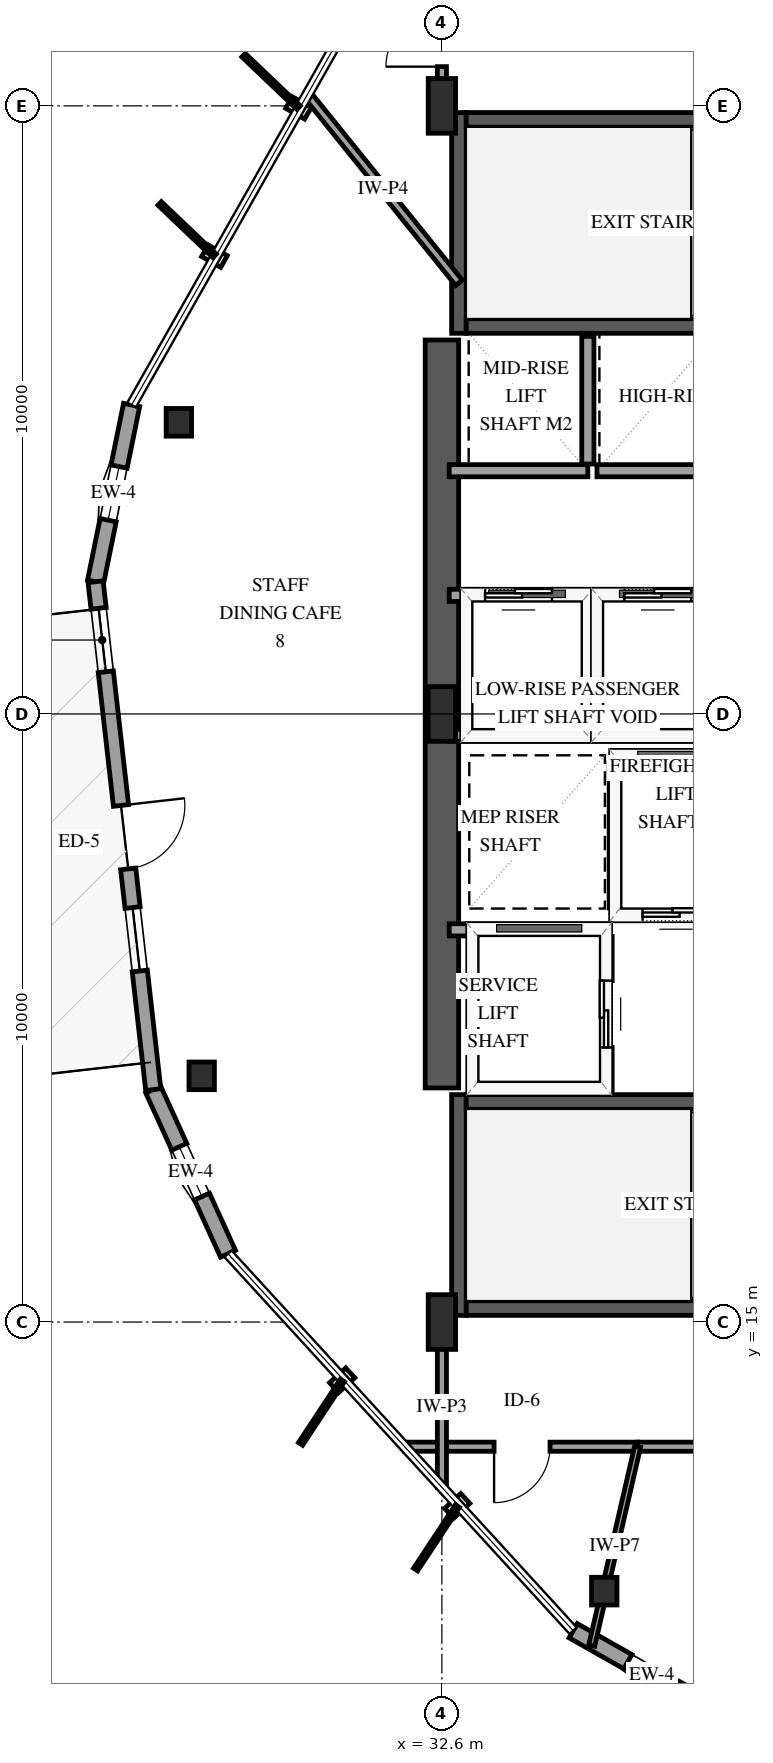
"""IFC4 building model, lengths in metres.
Left out: names, types, materials, properties, quantities, classifications, styles, units other than length and angle.
Written with IfcOpenShell. Run it as: python <this file> out.ifc"""

import sys

from ifc_helpers import new_model, si_unit, direction, frame, frame_2d, origin, origin_2d, place, context, subcontext, project, spatial, rectangle, i_section, extrude, element, fill, save


model = new_model("IFC4")
c1 = context("Model", 3, precision=1e-05, world=origin(), true_north=direction((0.0, 1.0)))
c2 = subcontext(c1, "Body", "Model", "MODEL_VIEW")
j1 = project(units=[si_unit("LENGTHUNIT", "METRE"), si_unit("PLANEANGLEUNIT", "RADIAN")], contexts=[c1])
p1 = place(None, origin())
s1 = spatial("IfcSite", under=j1, at=p1, CompositionType="ELEMENT")
p2 = place(p1, origin())
s2 = spatial("IfcBuilding", under=s1, at=p2, CompositionType="ELEMENT")
p3 = place(p2, frame((0.0, 0.0, 122.5)))
s3 = spatial("IfcBuildingStorey", under=s2, at=p3, CompositionType="ELEMENT", Elevation=122.5)
p4 = place(p3, frame((32.88, 15.11, 0.0), z_axis=(0.0, 0.0, 1.0), x_axis=(0.0, 1.0, 0.0)))
e1 = element("IfcWall", 1, at=p4, inside=s3, PredefinedType="SHEAR", context=c2, shape_type="SweptSolid", body=[
    extrude(rectangle(XDim=3.63, YDim=0.24, at=frame_2d((1.815, 0.0))), origin(), (0.0, 0.0, 1.0), 3.9),
])
for number, where, z_axis, x_axis in (
    (2, (33.0, 15.23, 0.0), (0.0, 0.0, 1.0), (1.0, 0.0, 0.0)),
    (3, (33.0, 18.62, 0.0), (0.0, 0.0, 1.0), (1.0, 0.0, 0.0)),
):
    element("IfcWall", number, at=place(p3, frame(where, z_axis=z_axis, x_axis=x_axis)), inside=s3, PredefinedType="SHEAR", context=c2, shape_type="SweptSolid", body=[
        extrude(rectangle(XDim=8.0, YDim=0.24, at=frame_2d((4.0, 0.0))), origin(), (0.0, 0.0, 1.0), 3.9),
    ])
p5 = place(p3, frame((32.88, 31.26, 0.0), z_axis=(0.0, 0.0, 1.0), x_axis=(0.0, 1.0, 0.0)))
e4 = element("IfcWall", 4, at=p5, inside=s3, PredefinedType="SHEAR", context=c2, shape_type="SweptSolid", body=[
    extrude(rectangle(XDim=3.63, YDim=0.24, at=frame_2d((1.815, 0.0))), origin(), (0.0, 0.0, 1.0), 3.9),
])
for number, where, z_axis, x_axis in (
    (5, (33.0, 31.38, 0.0), (0.0, 0.0, 1.0), (1.0, 0.0, 0.0)),
    (6, (33.0, 34.77, 0.0), (0.0, 0.0, 1.0), (1.0, 0.0, 0.0)),
):
    element("IfcWall", number, at=place(p3, frame(where, z_axis=z_axis, x_axis=x_axis)), inside=s3, PredefinedType="SHEAR", context=c2, shape_type="SweptSolid", body=[
        extrude(rectangle(XDim=8.0, YDim=0.24, at=frame_2d((4.0, 0.0))), origin(), (0.0, 0.0, 1.0), 3.9),
    ])
p6 = place(p3, frame((32.6, 18.85, 0.0), z_axis=(0.0, 0.0, 1.0), x_axis=(0.0, 1.0, 0.0)))
e7 = element("IfcWall", 7, at=p6, inside=s3, PredefinedType="SHEAR", context=c2, shape_type="SweptSolid", body=[
    extrude(rectangle(XDim=12.3, YDim=0.55, at=frame_2d((6.15, 0.0))), origin(), (0.0, 0.0, 1.0), 3.9),
])
for number, where, z_axis, x_axis in (
    (8, (32.6, 15.0, 0.0), (0.0, 0.0, 1.0), (1.0, 0.0, 0.0)),
    (9, (32.6, 25.0, 0.0), (0.0, 0.0, 1.0), (1.0, 0.0, 0.0)),
    (10, (32.6, 35.0, 0.0), (0.0, 0.0, 1.0), (1.0, 0.0, 0.0)),
):
    element("IfcColumn", number, at=place(p3, frame(where, z_axis=z_axis, x_axis=x_axis)), inside=s3, PredefinedType="PILASTER", context=c2, shape_type="SweptSolid", body=[
        extrude(rectangle(XDim=0.45, YDim=0.9, at=origin_2d()), origin(), (0.0, 0.0, 1.0), 3.9),
    ])
for number, where, z_axis, x_axis in (
    (11, (28.274, 29.796, 0.0), (0.0, 0.0, 1.0), (1.0, 0.0, 0.0)),
    (12, (28.649, 19.049, 0.0), (0.0, 0.0, 1.0), (1.0, 0.0, 0.0)),
    (13, (35.27, 10.575, 0.0), (0.0, 0.0, 1.0), (1.0, 0.0, 0.0)),
):
    element("IfcColumn", number, at=place(p3, frame(where, z_axis=z_axis, x_axis=x_axis)), inside=s3, PredefinedType="COLUMN", context=c2, shape_type="SweptSolid", body=[
        extrude(i_section(OverallWidth=0.418, OverallDepth=0.455, WebThickness=0.042, FlangeThickness=0.068, FilletRadius=0.038, at=origin_2d()), origin(), (0.0, 0.0, 1.0), 3.9),
    ])
p7 = place(p3, frame((27.497, 30.081, 0.0), z_axis=(0.0, 0.0, 1.0), x_axis=(-0.199723000862, -0.979852398541, 0.0)))
e14 = element("IfcWall", 14, at=p7, inside=s3, PredefinedType="SOLIDWALL", context=c2, shape_type="SweptSolid", body=[
    extrude(rectangle(XDim=2.967, YDim=0.27, at=frame_2d((1.483, 0.0))), origin(), (0.0, 0.0, 1.0), 2.979),
])
p8 = place(p7, frame((1.033, 0.0, 0.75)))
e15 = element("IfcOpeningElement", 15, at=p8, cuts=e14, PredefinedType="OPENING", context=c2, shape_type="SweptSolid", body=[
    extrude(rectangle(XDim=0.9, YDim=1.5, at=frame_2d((0.45, 0.75))), frame((0.0, 0.145, 0.0), z_axis=(0.0, -1.0, 0.0), x_axis=(1.0, 0.0, 0.0)), (0.0, 0.0, 1.0), 0.29),
])
p9 = place(p3, frame((27.853, 18.823, 0.0), z_axis=(0.0, 0.0, 1.0), x_axis=(0.41436090181, -0.910112654044, 0.0)))
e16 = element("IfcWall", 16, at=p9, inside=s3, PredefinedType="SOLIDWALL", context=c2, shape_type="SweptSolid", body=[
    extrude(rectangle(XDim=2.967, YDim=0.27, at=frame_2d((1.483, 0.0))), origin(), (0.0, 0.0, 1.0), 2.979),
])
p10 = place(p9, frame((1.033, 0.0, 0.75)))
e17 = element("IfcOpeningElement", 17, at=p10, cuts=e16, PredefinedType="OPENING", context=c2, shape_type="SweptSolid", body=[
    extrude(rectangle(XDim=0.9, YDim=1.5, at=frame_2d((0.45, 0.75))), frame((0.0, 0.145, 0.0), z_axis=(0.0, -1.0, 0.0), x_axis=(1.0, 0.0, 0.0)), (0.0, 0.0, 1.0), 0.29),
])
p11 = place(p3, frame((26.905, 27.174, 0.0), z_axis=(0.0, 0.0, 1.0), x_axis=(0.112873191476, -0.993609401448, 0.0)))
e18 = element("IfcWall", 18, at=p11, inside=s3, PredefinedType="SOLIDWALL", context=c2, shape_type="SweptSolid", body=[
    extrude(rectangle(XDim=8.405, YDim=0.25, at=frame_2d((4.203, 0.0))), origin(), (0.0, 0.0, 1.0), 2.979),
])
p12 = place(p11, frame((3.703, 0.0, 0.0)))
e19 = element("IfcOpeningElement", 19, at=p12, cuts=e18, PredefinedType="OPENING", context=c2, shape_type="SweptSolid", body=[
    extrude(rectangle(XDim=1.05, YDim=2.15, at=frame_2d((0.525, 1.075))), frame((0.0, 0.135, 0.0), z_axis=(0.0, -1.0, 0.0), x_axis=(1.0, 0.0, 0.0)), (0.0, 0.0, 1.0), 0.27),
])
p13 = place(p11, frame((0.44, 0.0, 0.72)))
e20 = element("IfcOpeningElement", 20, at=p13, cuts=e18, PredefinedType="OPENING", context=c2, shape_type="SweptSolid", body=[
    extrude(rectangle(XDim=1.05, YDim=1.55, at=frame_2d((0.525, 0.775))), frame((0.0, 0.135, 0.0), z_axis=(0.0, -1.0, 0.0), x_axis=(1.0, 0.0, 0.0)), (0.0, 0.0, 1.0), 0.27),
])
p14 = place(p11, frame((5.393, 0.0, 0.72)))
e21 = element("IfcOpeningElement", 21, at=p14, cuts=e18, PredefinedType="OPENING", context=c2, shape_type="SweptSolid", body=[
    extrude(rectangle(XDim=1.05, YDim=1.55, at=frame_2d((0.525, 0.775))), frame((0.0, 0.135, 0.0), z_axis=(0.0, -1.0, 0.0), x_axis=(1.0, 0.0, 0.0)), (0.0, 0.0, 1.0), 0.27),
])
p15 = place(p3, frame((34.759, 9.924, 0.0), z_axis=(0.0, 0.0, 1.0), x_axis=(0.870196274844, -0.492705229572, 0.0)))
e22 = element("IfcWall", 22, at=p15, inside=s3, PredefinedType="SOLIDWALL", context=c2, shape_type="SweptSolid", body=[
    extrude(rectangle(XDim=2.967, YDim=0.27, at=frame_2d((1.483, 0.0))), origin(), (0.0, 0.0, 1.0), 2.979),
])
p16 = place(p15, frame((1.033, 0.0, 0.75)))
e23 = element("IfcOpeningElement", 23, at=p16, cuts=e22, PredefinedType="OPENING", context=c2, shape_type="SweptSolid", body=[
    extrude(rectangle(XDim=0.9, YDim=1.5, at=frame_2d((0.45, 0.75))), frame((0.0, 0.145, 0.0), z_axis=(0.0, -1.0, 0.0), x_axis=(1.0, 0.0, 0.0)), (0.0, 0.0, 1.0), 0.29),
])
p17 = place(p3, frame((35.45, 21.7, 0.0), z_axis=(0.0, 0.0, 1.0), x_axis=(1.0, 0.0, 0.0)))
e24 = element("IfcWall", 24, at=p17, inside=s3, PredefinedType="SOLIDWALL", context=c2, shape_type="SweptSolid", body=[
    extrude(rectangle(XDim=2.0, YDim=0.2, at=frame_2d((1.0, 0.0))), origin(), (0.0, 0.0, 1.0), 3.6),
])
p18 = place(p17, frame((0.45, 0.0, 0.0)))
e25 = element("IfcOpeningElement", 25, at=p18, cuts=e24, PredefinedType="OPENING", context=c2, shape_type="SweptSolid", body=[
    extrude(rectangle(XDim=1.1, YDim=2.15, at=frame_2d((0.55, 1.075))), frame((0.0, 0.11, 0.0), z_axis=(0.0, -1.0, 0.0), x_axis=(1.0, 0.0, 0.0)), (0.0, 0.0, 1.0), 0.22),
])
p19 = place(p3, frame((35.45, 24.3, 0.0), z_axis=(0.0, 0.0, 1.0), x_axis=(1.0, 0.0, 0.0)))
e26 = element("IfcWall", 26, at=p19, inside=s3, PredefinedType="SOLIDWALL", context=c2, shape_type="SweptSolid", body=[
    extrude(rectangle(XDim=2.0, YDim=0.2, at=frame_2d((1.0, 0.0))), origin(), (0.0, 0.0, 1.0), 3.6),
])
p20 = place(p3, frame((35.45, 21.81, 0.0), z_axis=(0.0, 0.0, 1.0), x_axis=(0.0, 1.0, 0.0)))
e27 = element("IfcWall", 27, at=p20, inside=s3, PredefinedType="SOLIDWALL", context=c2, shape_type="SweptSolid", body=[
    extrude(rectangle(XDim=2.38, YDim=0.2, at=frame_2d((1.19, 0.0))), origin(), (0.0, 0.0, 1.0), 3.6),
])
p21 = place(p3, frame((32.72, 21.45, 0.0), z_axis=(0.0, 0.0, 1.0), x_axis=(1.0, 0.0, 0.0)))
e28 = element("IfcWall", 28, at=p21, inside=s3, PredefinedType="SOLIDWALL", context=c2, shape_type="SweptSolid", body=[
    extrude(rectangle(XDim=2.58, YDim=0.2, at=frame_2d((1.29, 0.0))), origin(), (0.0, 0.0, 1.0), 3.6),
])
p22 = place(p3, frame((35.3, 18.79, 0.0), z_axis=(0.0, 0.0, 1.0), x_axis=(0.0, 1.0, 0.0)))
e29 = element("IfcWall", 29, at=p22, inside=s3, PredefinedType="SOLIDWALL", context=c2, shape_type="SweptSolid", body=[
    extrude(rectangle(XDim=2.55, YDim=0.2, at=frame_2d((1.275, 0.0))), origin(), (0.0, 0.0, 1.0), 3.6),
])
p23 = place(p22, frame((0.725, 0.0, 0.0)))
e30 = element("IfcOpeningElement", 30, at=p23, cuts=e29, PredefinedType="OPENING", context=c2, shape_type="SweptSolid", body=[
    extrude(rectangle(XDim=1.1, YDim=2.15, at=frame_2d((0.55, 1.075))), frame((0.0, 0.11, 0.0), z_axis=(0.0, -1.0, 0.0), x_axis=(1.0, 0.0, 0.0)), (0.0, 0.0, 1.0), 0.22),
])
p24 = place(p3, frame((32.72, 24.65, 0.0), z_axis=(0.0, 0.0, 1.0), x_axis=(1.0, 0.0, 0.0)))
e31 = element("IfcWall", 31, at=p24, inside=s3, PredefinedType="SOLIDWALL", context=c2, shape_type="SweptSolid", body=[
    extrude(rectangle(XDim=2.28, YDim=0.2, at=frame_2d((1.14, 0.0))), origin(), (0.0, 0.0, 1.0), 3.6),
])
p25 = place(p3, frame((32.72, 26.95, 0.0), z_axis=(0.0, 0.0, 1.0), x_axis=(1.0, 0.0, 0.0)))
e32 = element("IfcWall", 32, at=p25, inside=s3, PredefinedType="SOLIDWALL", context=c2, shape_type="SweptSolid", body=[
    extrude(rectangle(XDim=2.28, YDim=0.2, at=frame_2d((1.14, 0.0))), origin(), (0.0, 0.0, 1.0), 3.6),
])
p26 = place(p25, frame((0.59, 0.0, 0.0)))
e33 = element("IfcOpeningElement", 33, at=p26, cuts=e32, PredefinedType="OPENING", context=c2, shape_type="SweptSolid", body=[
    extrude(rectangle(XDim=1.1, YDim=2.15, at=frame_2d((0.55, 1.075))), frame((0.0, 0.11, 0.0), z_axis=(0.0, -1.0, 0.0), x_axis=(1.0, 0.0, 0.0)), (0.0, 0.0, 1.0), 0.22),
])
p27 = place(p3, frame((35.0, 24.76, 0.0), z_axis=(0.0, 0.0, 1.0), x_axis=(0.0, 1.0, 0.0)))
e34 = element("IfcWall", 34, at=p27, inside=s3, PredefinedType="SOLIDWALL", context=c2, shape_type="SweptSolid", body=[
    extrude(rectangle(XDim=2.08, YDim=0.2, at=frame_2d((1.04, 0.0))), origin(), (0.0, 0.0, 1.0), 3.6),
])
p28 = place(p3, frame((35.15, 24.65, 0.0), z_axis=(0.0, 0.0, 1.0), x_axis=(1.0, 0.0, 0.0)))
e35 = element("IfcWall", 35, at=p28, inside=s3, PredefinedType="SOLIDWALL", context=c2, shape_type="SweptSolid", body=[
    extrude(rectangle(XDim=2.0, YDim=0.2, at=frame_2d((1.0, 0.0))), origin(), (0.0, 0.0, 1.0), 3.6),
])
p29 = place(p3, frame((35.15, 26.95, 0.0), z_axis=(0.0, 0.0, 1.0), x_axis=(1.0, 0.0, 0.0)))
e36 = element("IfcWall", 36, at=p29, inside=s3, PredefinedType="SOLIDWALL", context=c2, shape_type="SweptSolid", body=[
    extrude(rectangle(XDim=2.0, YDim=0.2, at=frame_2d((1.0, 0.0))), origin(), (0.0, 0.0, 1.0), 3.6),
])
p30 = place(p29, frame((0.45, 0.0, 0.0)))
e37 = element("IfcOpeningElement", 37, at=p30, cuts=e36, PredefinedType="OPENING", context=c2, shape_type="SweptSolid", body=[
    extrude(rectangle(XDim=1.1, YDim=2.15, at=frame_2d((0.55, 1.075))), frame((0.0, 0.11, 0.0), z_axis=(0.0, -1.0, 0.0), x_axis=(1.0, 0.0, 0.0)), (0.0, 0.0, 1.0), 0.22),
])
p31 = place(p3, frame((32.72, 29.0, 0.0), z_axis=(0.0, 0.0, 1.0), x_axis=(1.0, 0.0, 0.0)))
e38 = element("IfcWall", 38, at=p31, inside=s3, PredefinedType="SOLIDWALL", context=c2, shape_type="SweptSolid", body=[
    extrude(rectangle(XDim=2.28, YDim=0.2, at=frame_2d((1.14, 0.0))), origin(), (0.0, 0.0, 1.0), 3.6),
])
p32 = place(p3, frame((35.0, 29.11, 0.0), z_axis=(0.0, 0.0, 1.0), x_axis=(0.0, 1.0, 0.0)))
e39 = element("IfcWall", 39, at=p32, inside=s3, PredefinedType="SOLIDWALL", context=c2, shape_type="SweptSolid", body=[
    extrude(rectangle(XDim=2.1, YDim=0.2, at=frame_2d((1.05, 0.0))), origin(), (0.0, 0.0, 1.0), 3.6),
])
p33 = place(p3, frame((35.15, 29.0, 0.0), z_axis=(0.0, 0.0, 1.0), x_axis=(1.0, 0.0, 0.0)))
e40 = element("IfcWall", 40, at=p33, inside=s3, PredefinedType="SOLIDWALL", context=c2, shape_type="SweptSolid", body=[
    extrude(rectangle(XDim=2.0, YDim=0.2, at=frame_2d((1.0, 0.0))), origin(), (0.0, 0.0, 1.0), 3.6),
])
p34 = place(p3, frame((43.455, 12.95, 0.0), z_axis=(0.0, 0.0, 1.0), x_axis=(-1.0, 0.0, 0.0)))
e41 = element("IfcWall", 41, at=p34, inside=s3, PredefinedType="PARTITIONING", context=c2, shape_type="SweptSolid", body=[
    extrude(rectangle(XDim=7.637, YDim=0.15, at=frame_2d((3.818, 0.0))), origin(), (0.0, 0.0, 1.0), 3.6),
])
p35 = place(p34, frame((3.344, 0.0, 0.0)))
e42 = element("IfcOpeningElement", 42, at=p35, cuts=e41, PredefinedType="OPENING", context=c2, shape_type="SweptSolid", body=[
    extrude(rectangle(XDim=0.92, YDim=2.12, at=frame_2d((0.46, 1.06))), frame((0.0, 0.085, 0.0), z_axis=(0.0, -1.0, 0.0), x_axis=(1.0, 0.0, 0.0)), (0.0, 0.0, 1.0), 0.17),
])
p36 = place(p3, frame((32.88, 32.091, 0.0), z_axis=(0.0, 0.0, 1.0), x_axis=(-0.627800500923, 0.778374287243, 0.0)))
e43 = element("IfcWall", 43, at=p36, inside=s3, PredefinedType="PARTITIONING", context=c2, shape_type="SweptSolid", body=[
    extrude(rectangle(XDim=3.972, YDim=0.14, at=frame_2d((1.986, 0.0))), origin(), (0.0, 0.0, 1.0), 3.6),
])
p37 = place(p3, frame((35.818, 12.95, 0.0), z_axis=(0.0, 0.0, 1.0), x_axis=(-1.0, 0.0, 0.0)))
e44 = element("IfcWall", 44, at=p37, inside=s3, PredefinedType="PARTITIONING", context=c2, shape_type="SweptSolid", body=[
    extrude(rectangle(XDim=3.83, YDim=0.15, at=frame_2d((1.915, 0.0))), origin(), (0.0, 0.0, 1.0), 3.6),
])
p38 = place(p37, frame((1.44, 0.0, 0.0)))
e45 = element("IfcOpeningElement", 45, at=p38, cuts=e44, PredefinedType="OPENING", context=c2, shape_type="SweptSolid", body=[
    extrude(rectangle(XDim=0.92, YDim=2.12, at=frame_2d((0.46, 1.06))), frame((0.0, 0.085, 0.0), z_axis=(0.0, -1.0, 0.0), x_axis=(1.0, 0.0, 0.0)), (0.0, 0.0, 1.0), 0.17),
])
p39 = place(p3, frame((35.818, 12.95, 0.0), z_axis=(0.0, 0.0, 1.0), x_axis=(-0.224790414322, -0.974407137509, 0.0)))
e46 = element("IfcWall", 46, at=p39, inside=s3, PredefinedType="PARTITIONING", context=c2, shape_type="SweptSolid", body=[
    extrude(rectangle(XDim=3.355, YDim=0.1, at=frame_2d((1.677, 0.0))), origin(), (0.0, 0.0, 1.0), 2.895),
])
p40 = place(p3, frame((32.6, 12.281, 0.0), z_axis=(0.0, 0.0, 1.0), x_axis=(0.0, 1.0, 0.0)))
e47 = element("IfcWall", 47, at=p40, inside=s3, PredefinedType="PARTITIONING", context=c2, shape_type="SweptSolid", body=[
    extrude(rectangle(XDim=2.649, YDim=0.15, at=frame_2d((1.324, 0.0))), origin(), (0.0, 0.0, 1.0), 3.6),
])
p41 = place(p3, frame((32.6, 35.07, 0.0), z_axis=(0.0, 0.0, 1.0), x_axis=(0.0, 1.0, 0.0)))
e48 = element("IfcWall", 48, at=p41, inside=s3, PredefinedType="PARTITIONING", context=c2, shape_type="SweptSolid", body=[
    extrude(rectangle(XDim=1.91, YDim=0.15, at=frame_2d((0.955, 0.0))), origin(), (0.0, 0.0, 1.0), 3.6),
])
p42 = place(p41, frame((0.575, 0.0, 0.0)))
e49 = element("IfcOpeningElement", 49, at=p42, cuts=e48, PredefinedType="OPENING", context=c2, shape_type="SweptSolid", body=[
    extrude(rectangle(XDim=0.92, YDim=2.12, at=frame_2d((0.46, 1.06))), frame((0.0, 0.085, 0.0), z_axis=(0.0, -1.0, 0.0), x_axis=(1.0, 0.0, 0.0)), (0.0, 0.0, 1.0), 0.17),
])
p43 = place(p8, origin())
e50 = element("IfcWindow", 50, at=p43, inside=s3, PartitioningType="SINGLE_PANEL", PredefinedType="WINDOW", context=c2, shape_type="SweptSolid", body=[
    extrude(rectangle(XDim=0.9, YDim=1.5, at=frame_2d((0.45, 0.75))), frame((0.0, 0.03, 0.0), z_axis=(0.0, -1.0, 0.0), x_axis=(1.0, 0.0, 0.0)), (0.0, 0.0, 1.0), 0.06),
])
fill(e15, e50)
p44 = place(p10, origin())
e51 = element("IfcWindow", 51, at=p44, inside=s3, PartitioningType="SINGLE_PANEL", PredefinedType="WINDOW", context=c2, shape_type="SweptSolid", body=[
    extrude(rectangle(XDim=0.9, YDim=1.5, at=frame_2d((0.45, 0.75))), frame((0.0, 0.03, 0.0), z_axis=(0.0, -1.0, 0.0), x_axis=(1.0, 0.0, 0.0)), (0.0, 0.0, 1.0), 0.06),
])
fill(e17, e51)
p45 = place(p12, origin())
e52 = element("IfcDoor", 52, at=p45, inside=s3, OperationType="SINGLE_SWING_LEFT", PredefinedType="DOOR", context=c2, shape_type="SweptSolid", body=[
    extrude(rectangle(XDim=1.05, YDim=2.15, at=frame_2d((0.525, 1.075))), frame((0.0, 0.025, 0.0), z_axis=(0.0, -1.0, 0.0), x_axis=(1.0, 0.0, 0.0)), (0.0, 0.0, 1.0), 0.05),
])
fill(e19, e52)
p46 = place(p13, origin())
e53 = element("IfcWindow", 53, at=p46, inside=s3, PartitioningType="SINGLE_PANEL", PredefinedType="WINDOW", context=c2, shape_type="SweptSolid", body=[
    extrude(rectangle(XDim=1.05, YDim=1.55, at=frame_2d((0.525, 0.775))), frame((0.0, 0.03, 0.0), z_axis=(0.0, -1.0, 0.0), x_axis=(1.0, 0.0, 0.0)), (0.0, 0.0, 1.0), 0.06),
])
fill(e20, e53)
p47 = place(p14, origin())
e54 = element("IfcWindow", 54, at=p47, inside=s3, PartitioningType="SINGLE_PANEL", PredefinedType="WINDOW", context=c2, shape_type="SweptSolid", body=[
    extrude(rectangle(XDim=1.05, YDim=1.55, at=frame_2d((0.525, 0.775))), frame((0.0, 0.03, 0.0), z_axis=(0.0, -1.0, 0.0), x_axis=(1.0, 0.0, 0.0)), (0.0, 0.0, 1.0), 0.06),
])
fill(e21, e54)
p48 = place(p16, origin())
e55 = element("IfcWindow", 55, at=p48, inside=s3, PartitioningType="SINGLE_PANEL", PredefinedType="WINDOW", context=c2, shape_type="SweptSolid", body=[
    extrude(rectangle(XDim=0.9, YDim=1.5, at=frame_2d((0.45, 0.75))), frame((0.0, 0.03, 0.0), z_axis=(0.0, -1.0, 0.0), x_axis=(1.0, 0.0, 0.0)), (0.0, 0.0, 1.0), 0.06),
])
fill(e23, e55)
p49 = place(p18, origin())
e56 = element("IfcDoor", 56, at=p49, inside=s3, OperationType="SLIDING_TO_LEFT", PredefinedType="DOOR", context=c2, shape_type="SweptSolid", body=[
    extrude(rectangle(XDim=1.1, YDim=2.15, at=frame_2d((0.55, 1.075))), frame((0.0, 0.025, 0.0), z_axis=(0.0, -1.0, 0.0), x_axis=(1.0, 0.0, 0.0)), (0.0, 0.0, 1.0), 0.05),
])
fill(e25, e56)
p50 = place(p23, origin())
e57 = element("IfcDoor", 57, at=p50, inside=s3, OperationType="SLIDING_TO_LEFT", PredefinedType="DOOR", context=c2, shape_type="SweptSolid", body=[
    extrude(rectangle(XDim=1.1, YDim=2.15, at=frame_2d((0.55, 1.075))), frame((0.0, 0.025, 0.0), z_axis=(0.0, -1.0, 0.0), x_axis=(1.0, 0.0, 0.0)), (0.0, 0.0, 1.0), 0.05),
])
fill(e30, e57)
p51 = place(p26, origin())
e58 = element("IfcDoor", 58, at=p51, inside=s3, OperationType="SLIDING_TO_LEFT", PredefinedType="DOOR", context=c2, shape_type="SweptSolid", body=[
    extrude(rectangle(XDim=1.1, YDim=2.15, at=frame_2d((0.55, 1.075))), frame((0.0, 0.025, 0.0), z_axis=(0.0, -1.0, 0.0), x_axis=(1.0, 0.0, 0.0)), (0.0, 0.0, 1.0), 0.05),
])
fill(e33, e58)
p52 = place(p30, origin())
e59 = element("IfcDoor", 59, at=p52, inside=s3, OperationType="SLIDING_TO_LEFT", PredefinedType="DOOR", context=c2, shape_type="SweptSolid", body=[
    extrude(rectangle(XDim=1.1, YDim=2.15, at=frame_2d((0.55, 1.075))), frame((0.0, 0.025, 0.0), z_axis=(0.0, -1.0, 0.0), x_axis=(1.0, 0.0, 0.0)), (0.0, 0.0, 1.0), 0.05),
])
fill(e37, e59)
p53 = place(p38, origin())
e60 = element("IfcDoor", 60, at=p53, inside=s3, OperationType="SINGLE_SWING_RIGHT", PredefinedType="DOOR", context=c2, shape_type="SweptSolid", body=[
    extrude(rectangle(XDim=0.92, YDim=2.12, at=frame_2d((0.46, 1.06))), frame((0.0, 0.025, 0.0), z_axis=(0.0, -1.0, 0.0), x_axis=(1.0, 0.0, 0.0)), (0.0, 0.0, 1.0), 0.05),
])
fill(e45, e60)
p54 = place(p42, origin())
e61 = element("IfcDoor", 61, at=p54, inside=s3, OperationType="SINGLE_SWING_LEFT", PredefinedType="DOOR", context=c2, shape_type="SweptSolid", body=[
    extrude(rectangle(XDim=0.92, YDim=2.12, at=frame_2d((0.46, 1.06))), frame((0.0, 0.025, 0.0), z_axis=(0.0, -1.0, 0.0), x_axis=(1.0, 0.0, 0.0)), (0.0, 0.0, 1.0), 0.05),
])
fill(e49, e61)
save(model, sys.argv[1])
